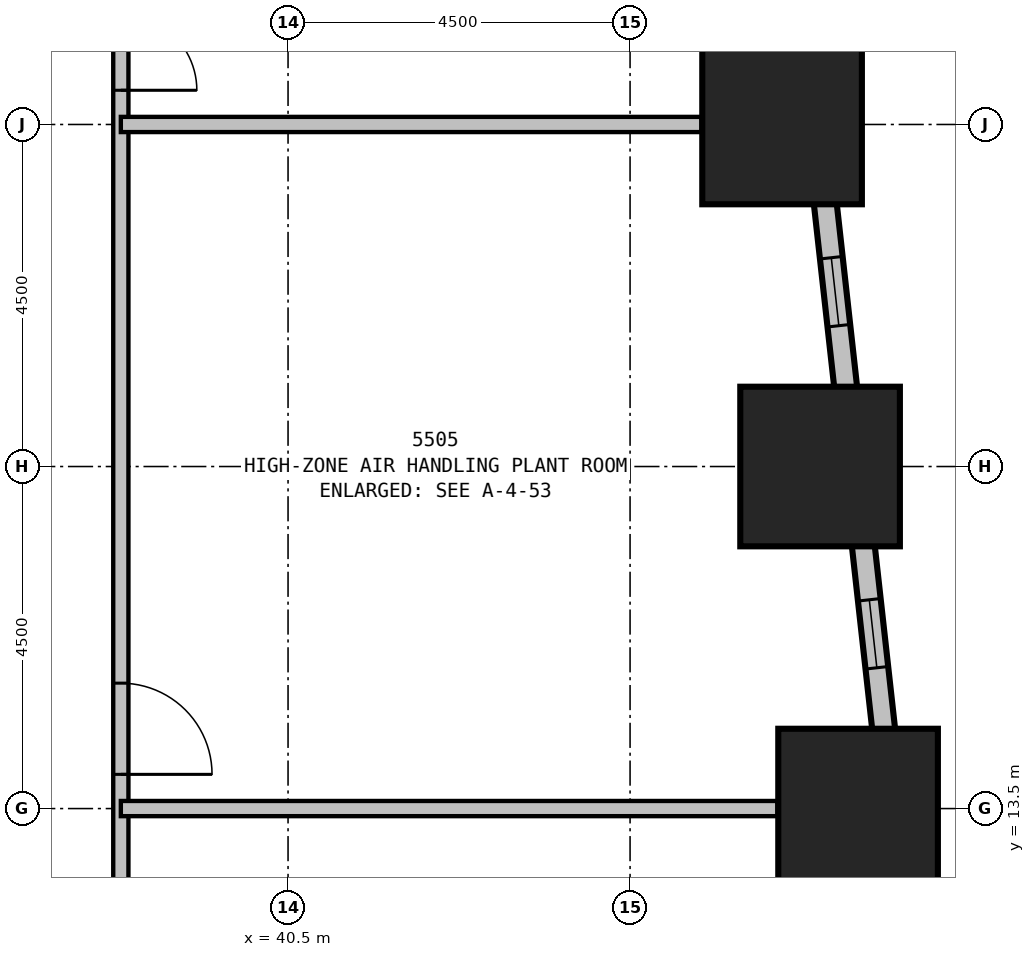
"""IFC4 building model, lengths in metres.
Left out: names, types, materials, properties, quantities, classifications, styles, units other than length and angle.
Written with IfcOpenShell. Run it as: python <this file> out.ifc"""

import sys

from ifc_helpers import new_model, si_unit, direction, frame, frame_2d, origin, origin_2d, place, context, subcontext, project, spatial, rectangle, extrude, element, fill, save


model = new_model("IFC4")
c1 = context("Model", 3, precision=1e-05, world=origin(), true_north=direction((0.0, 1.0)))
c2 = subcontext(c1, "Body", "Model", "MODEL_VIEW")
j1 = project(units=[si_unit("LENGTHUNIT", "METRE"), si_unit("PLANEANGLEUNIT", "RADIAN")], contexts=[c1])
p1 = place(None, origin())
s1 = spatial("IfcSite", under=j1, at=p1, CompositionType="ELEMENT")
p2 = place(p1, origin())
s2 = spatial("IfcBuilding", under=s1, at=p2, CompositionType="ELEMENT")
p3 = place(p2, frame((0.0, 0.0, 211.4)))
s3 = spatial("IfcBuildingStorey", under=s2, at=p3, CompositionType="ELEMENT", Elevation=211.4)
for number, where, z_axis, x_axis in (
    (1, (48.0, 13.5, 0.0), (0.0, 0.0, 1.0), (1.0, 0.0, 0.0)),
    (2, (47.5, 18.0, 0.0), (0.0, 0.0, 1.0), (1.0, 0.0, 0.0)),
    (3, (47.0, 22.5, 0.0), (0.0, 0.0, 1.0), (1.0, 0.0, 0.0)),
):
    element("IfcColumn", number, at=place(p3, frame(where, z_axis=z_axis, x_axis=x_axis)), inside=s3, PredefinedType="COLUMN", context=c2, shape_type="SweptSolid", body=[
        extrude(rectangle(XDim=2.1, YDim=2.1, at=origin_2d()), origin(), (0.0, 0.0, 1.0), 6.0),
    ])
p4 = place(p3, frame((49.519, 3.901, 0.0), z_axis=(0.0, 0.0, 1.0), x_axis=(-0.110429082637, 0.993884006164, 0.0)))
e4 = element("IfcWall", 4, at=p4, inside=s3, PredefinedType="STANDARD", context=c2, shape_type="SweptSolid", body=[
    extrude(rectangle(XDim=32.899, YDim=0.3, at=frame_2d((16.45, 0.0))), origin(), (0.0, 0.0, 1.0), 4.6),
])
p5 = place(p4, frame((2.467, 0.0, 0.5)))
e5 = element("IfcOpeningElement", 5, at=p5, cuts=e4, PredefinedType="OPENING", context=c2, shape_type="SweptSolid", body=[
    extrude(rectangle(XDim=0.9, YDim=1.2, at=frame_2d((0.45, 0.6))), frame((0.0, 0.16, 0.0), z_axis=(0.0, -1.0, 0.0), x_axis=(1.0, 0.0, 0.0)), (0.0, 0.0, 1.0), 0.32),
])
p6 = place(p4, frame((6.995, 0.0, 0.5)))
e6 = element("IfcOpeningElement", 6, at=p6, cuts=e4, PredefinedType="OPENING", context=c2, shape_type="SweptSolid", body=[
    extrude(rectangle(XDim=0.9, YDim=1.2, at=frame_2d((0.45, 0.6))), frame((0.0, 0.16, 0.0), z_axis=(0.0, -1.0, 0.0), x_axis=(1.0, 0.0, 0.0)), (0.0, 0.0, 1.0), 0.32),
])
p7 = place(p4, frame((11.522, 0.0, 0.5)))
e7 = element("IfcOpeningElement", 7, at=p7, cuts=e4, PredefinedType="OPENING", context=c2, shape_type="SweptSolid", body=[
    extrude(rectangle(XDim=0.9, YDim=1.2, at=frame_2d((0.45, 0.6))), frame((0.0, 0.16, 0.0), z_axis=(0.0, -1.0, 0.0), x_axis=(1.0, 0.0, 0.0)), (0.0, 0.0, 1.0), 0.32),
])
p8 = place(p4, frame((16.05, 0.0, 0.5)))
e8 = element("IfcOpeningElement", 8, at=p8, cuts=e4, PredefinedType="OPENING", context=c2, shape_type="SweptSolid", body=[
    extrude(rectangle(XDim=0.9, YDim=1.2, at=frame_2d((0.45, 0.6))), frame((0.0, 0.16, 0.0), z_axis=(0.0, -1.0, 0.0), x_axis=(1.0, 0.0, 0.0)), (0.0, 0.0, 1.0), 0.32),
])
p9 = place(p4, frame((20.578, 0.0, 0.5)))
e9 = element("IfcOpeningElement", 9, at=p9, cuts=e4, PredefinedType="OPENING", context=c2, shape_type="SweptSolid", body=[
    extrude(rectangle(XDim=0.9, YDim=1.2, at=frame_2d((0.45, 0.6))), frame((0.0, 0.16, 0.0), z_axis=(0.0, -1.0, 0.0), x_axis=(1.0, 0.0, 0.0)), (0.0, 0.0, 1.0), 0.32),
])
p10 = place(p4, frame((25.105, 0.0, 0.5)))
e10 = element("IfcOpeningElement", 10, at=p10, cuts=e4, PredefinedType="OPENING", context=c2, shape_type="SweptSolid", body=[
    extrude(rectangle(XDim=0.9, YDim=1.2, at=frame_2d((0.45, 0.6))), frame((0.0, 0.16, 0.0), z_axis=(0.0, -1.0, 0.0), x_axis=(1.0, 0.0, 0.0)), (0.0, 0.0, 1.0), 0.32),
])
p11 = place(p4, frame((29.633, 0.0, 0.5)))
e11 = element("IfcOpeningElement", 11, at=p11, cuts=e4, PredefinedType="OPENING", context=c2, shape_type="SweptSolid", body=[
    extrude(rectangle(XDim=0.9, YDim=1.2, at=frame_2d((0.45, 0.6))), frame((0.0, 0.16, 0.0), z_axis=(0.0, -1.0, 0.0), x_axis=(1.0, 0.0, 0.0)), (0.0, 0.0, 1.0), 0.32),
])
p12 = place(p3, frame((38.3, 11.2, 0.0), z_axis=(0.0, 0.0, 1.0), x_axis=(0.0, 1.0, 0.0)))
e12 = element("IfcWall", 12, at=p12, inside=s3, PredefinedType="PARTITIONING", context=c2, shape_type="SweptSolid", body=[
    extrude(rectangle(XDim=18.1, YDim=0.2, at=frame_2d((9.05, 0.0))), origin(), (0.0, 0.0, 1.0), 5.75),
])
p13 = place(p12, frame((3.95, 0.0, 0.0), z_axis=(0.0, 0.0, 1.0), x_axis=(-1.0, 0.0, 0.0)))
e13 = element("IfcOpeningElement", 13, at=p13, cuts=e12, PredefinedType="OPENING", context=c2, shape_type="SweptSolid", body=[
    extrude(rectangle(XDim=1.2, YDim=2.1, at=frame_2d((0.6, 1.05))), frame((0.0, 0.11, 0.0), z_axis=(0.0, -1.0, 0.0), x_axis=(1.0, 0.0, 0.0)), (0.0, 0.0, 1.0), 0.22),
])
p14 = place(p12, frame((12.75, 0.0, 0.0), z_axis=(0.0, 0.0, 1.0), x_axis=(-1.0, 0.0, 0.0)))
e14 = element("IfcOpeningElement", 14, at=p14, cuts=e12, PredefinedType="OPENING", context=c2, shape_type="SweptSolid", body=[
    extrude(rectangle(XDim=1.0, YDim=2.1, at=frame_2d((0.5, 1.05))), frame((0.0, 0.11, 0.0), z_axis=(0.0, -1.0, 0.0), x_axis=(1.0, 0.0, 0.0)), (0.0, 0.0, 1.0), 0.22),
])
p15 = place(p3, frame((38.3, 13.5, 0.0), z_axis=(0.0, 0.0, 1.0), x_axis=(1.0, 0.0, 0.0)))
e15 = element("IfcWall", 15, at=p15, inside=s3, PredefinedType="PARTITIONING", context=c2, shape_type="SweptSolid", body=[
    extrude(rectangle(XDim=8.639, YDim=0.2, at=frame_2d((4.32, 0.0))), origin(), (0.0, 0.0, 1.0), 4.45),
])
p16 = place(p3, frame((38.3, 22.5, 0.0), z_axis=(0.0, 0.0, 1.0), x_axis=(1.0, 0.0, 0.0)))
e16 = element("IfcWall", 16, at=p16, inside=s3, PredefinedType="PARTITIONING", context=c2, shape_type="SweptSolid", body=[
    extrude(rectangle(XDim=7.639, YDim=0.2, at=frame_2d((3.82, 0.0))), origin(), (0.0, 0.0, 1.0), 4.75),
])
p17 = place(p7, origin())
e17 = element("IfcWindow", 17, at=p17, inside=s3, PartitioningType="SINGLE_PANEL", PredefinedType="USERDEFINED", context=c2, shape_type="SweptSolid", body=[
    extrude(rectangle(XDim=0.9, YDim=1.2, at=frame_2d((0.45, 0.6))), frame((0.0, 0.03, 0.0), z_axis=(0.0, -1.0, 0.0), x_axis=(1.0, 0.0, 0.0)), (0.0, 0.0, 1.0), 0.06),
])
fill(e7, e17)
p18 = place(p8, origin())
e18 = element("IfcWindow", 18, at=p18, inside=s3, PartitioningType="SINGLE_PANEL", PredefinedType="USERDEFINED", context=c2, shape_type="SweptSolid", body=[
    extrude(rectangle(XDim=0.9, YDim=1.2, at=frame_2d((0.45, 0.6))), frame((0.0, 0.03, 0.0), z_axis=(0.0, -1.0, 0.0), x_axis=(1.0, 0.0, 0.0)), (0.0, 0.0, 1.0), 0.06),
])
fill(e8, e18)
p19 = place(p13, origin())
e19 = element("IfcDoor", 19, at=p19, inside=s3, OperationType="SINGLE_SWING_RIGHT", PredefinedType="DOOR", context=c2, shape_type="SweptSolid", body=[
    extrude(rectangle(XDim=1.2, YDim=2.1, at=frame_2d((0.6, 1.05))), frame((0.0, 0.025, 0.0), z_axis=(0.0, -1.0, 0.0), x_axis=(1.0, 0.0, 0.0)), (0.0, 0.0, 1.0), 0.05),
])
fill(e13, e19)
p20 = place(p14, origin())
e20 = element("IfcDoor", 20, at=p20, inside=s3, OperationType="SINGLE_SWING_RIGHT", PredefinedType="DOOR", context=c2, shape_type="SweptSolid", body=[
    extrude(rectangle(XDim=1.0, YDim=2.1, at=frame_2d((0.5, 1.05))), frame((0.0, 0.025, 0.0), z_axis=(0.0, -1.0, 0.0), x_axis=(1.0, 0.0, 0.0)), (0.0, 0.0, 1.0), 0.05),
])
fill(e14, e20)
save(model, sys.argv[1])
